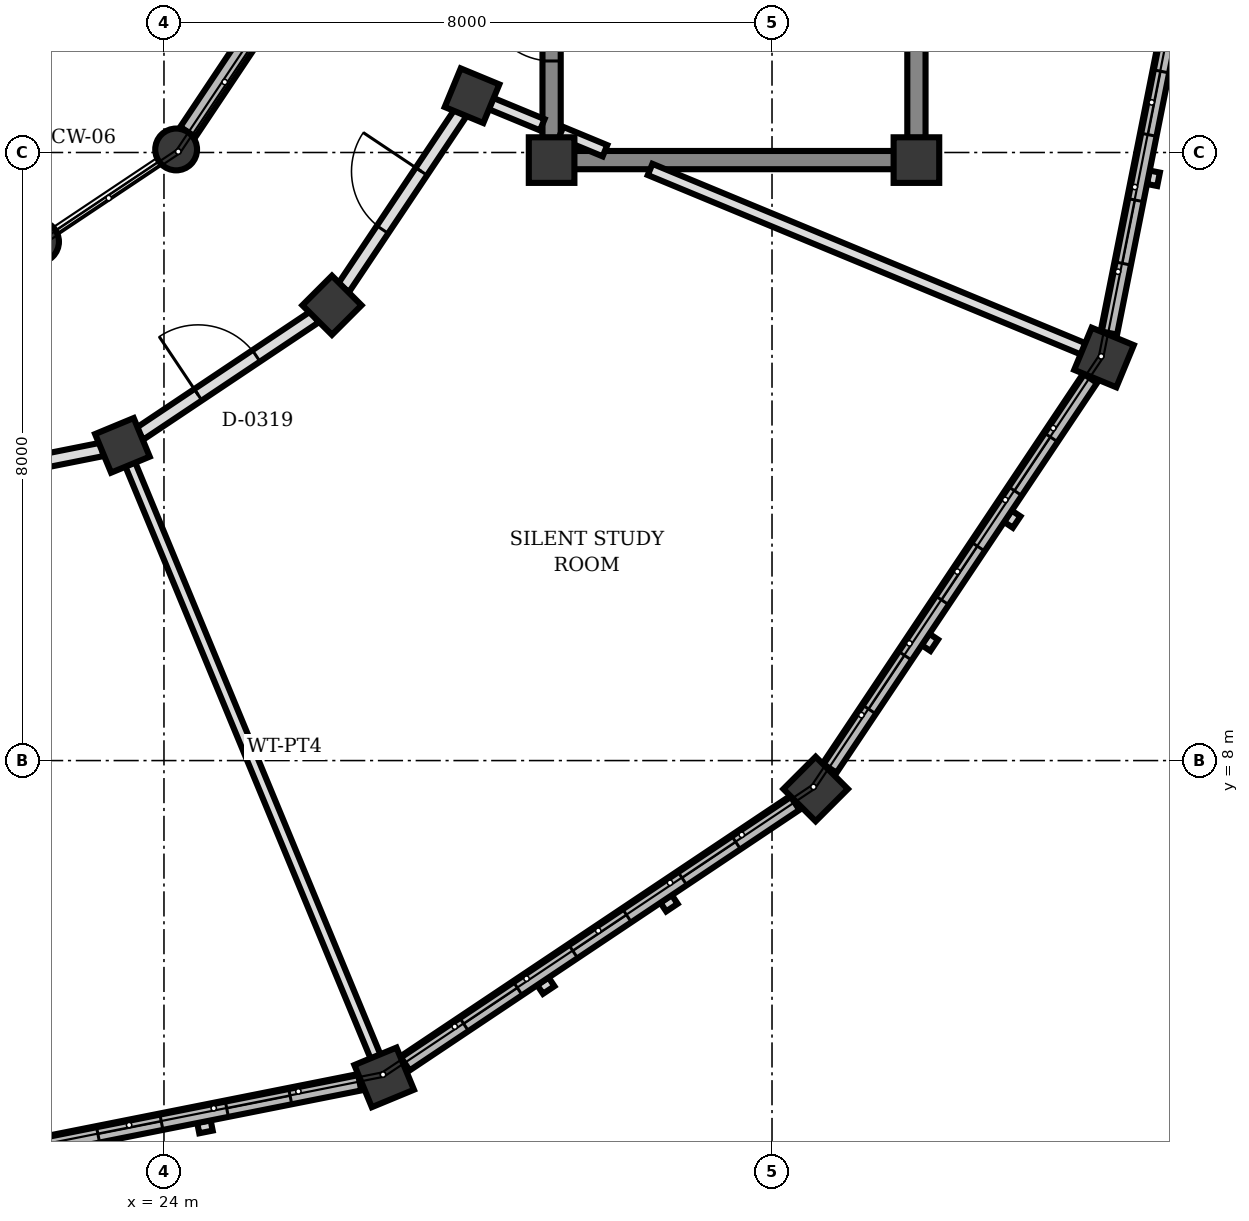
"""IFC4 building model, lengths in metres.
Left out: names, types, materials, properties, quantities, classifications, styles, units other than length and angle.
Written with IfcOpenShell. Run it as: python <this file> out.ifc"""

import sys

from ifc_helpers import new_model, si_unit, direction, frame, frame_2d, origin, origin_2d, place, context, subcontext, project, spatial, rectangle, circle, extrude, element, fill, save


model = new_model("IFC4")
c1 = context("Model", 3, precision=1e-05, world=origin(), true_north=direction((0.0, 1.0)))
c2 = subcontext(c1, "Body", "Model", "MODEL_VIEW")
j1 = project(units=[si_unit("LENGTHUNIT", "METRE"), si_unit("PLANEANGLEUNIT", "RADIAN")], contexts=[c1])
p1 = place(None, origin())
s1 = spatial("IfcSite", under=j1, at=p1, CompositionType="ELEMENT")
p2 = place(p1, origin())
s2 = spatial("IfcBuilding", under=s1, at=p2, CompositionType="ELEMENT")
p3 = place(p2, frame((0.0, 0.0, 12.5)))
s3 = spatial("IfcBuildingStorey", under=s2, at=p3, CompositionType="ELEMENT", Elevation=12.5)
for number, where, z_axis, x_axis in (
    (1, (29.1, 15.9, 0.0), (0.0, 0.0, 1.0), (1.0, 0.0, 0.0)),
    (2, (33.9, 15.9, 0.0), (0.0, 0.0, 1.0), (1.0, 0.0, 0.0)),
):
    element("IfcColumn", number, at=place(p3, frame(where, z_axis=z_axis, x_axis=x_axis)), inside=s3, PredefinedType="COLUMN", context=c2, shape_type="SweptSolid", body=[
        extrude(rectangle(XDim=0.6, YDim=0.6, at=origin_2d()), origin(), (0.0, 0.0, 1.0), 4.0),
    ])
for number, where, z_axis, x_axis in (
    (3, (22.343, 14.826, 0.0), (0.0, 0.0, 1.0), (1.0, 0.0, 0.0)),
    (4, (24.16, 16.04, 0.0), (0.0, 0.0, 1.0), (1.0, 0.0, 0.0)),
):
    element("IfcColumn", number, at=place(p3, frame(where, z_axis=z_axis, x_axis=x_axis)), inside=s3, PredefinedType="COLUMN", context=c2, shape_type="SweptSolid", body=[
        extrude(circle(Radius=0.275, at=origin_2d()), origin(), (0.0, 0.0, 1.0), 3.865),
    ])
for number, where, z_axis, x_axis in (
    (5, (23.453, 12.147, 0.0), (0.0, 0.0, 1.0), (0.383, -0.924, 0.0)),
    (6, (26.21, 13.99, 0.0), (0.0, 0.0, 1.0), (0.707, -0.707, 0.0)),
    (7, (28.053, 16.747, 0.0), (0.0, 0.0, 1.0), (0.924, -0.383, 0.0)),
):
    element("IfcColumn", number, at=place(p3, frame(where, z_axis=z_axis, x_axis=x_axis)), inside=s3, PredefinedType="COLUMN", context=c2, shape_type="SweptSolid", body=[
        extrude(rectangle(XDim=0.55, YDim=0.55, at=origin_2d()), origin(), (0.0, 0.0, 1.0), 4.59),
    ])
for number, where, z_axis, x_axis in (
    (8, (26.897, 3.832, 0.0), (0.0, 0.0, 1.0), (0.383, -0.924, 0.0)),
    (9, (32.574, 7.626, 0.0), (0.0, 0.0, 1.0), (0.707, -0.707, 0.0)),
    (10, (36.368, 13.303, 0.0), (0.0, 0.0, 1.0), (0.924, -0.383, 0.0)),
):
    element("IfcColumn", number, at=place(p3, frame(where, z_axis=z_axis, x_axis=x_axis)), inside=s3, PredefinedType="COLUMN", context=c2, shape_type="SweptSolid", body=[
        extrude(rectangle(XDim=0.6, YDim=0.6, at=origin_2d()), origin(), (0.0, 0.0, 1.0), 6.84),
    ])
p4 = place(p3, frame((26.574, 3.768, 0.0), z_axis=(0.0, 0.0, 1.0), x_axis=(-0.980770460131, -0.195164813773, 0.0)))
e11 = element("IfcWall", 11, at=p4, inside=s3, PredefinedType="SOLIDWALL", context=c2, shape_type="SweptSolid", body=[
    extrude(rectangle(XDim=6.17, YDim=0.22, at=frame_2d((3.085, 0.0))), origin(), (0.0, 0.0, 1.0), 6.35),
])
p5 = place(p4, frame((0.932, 0.0, 0.85)))
e12 = element("IfcOpeningElement", 12, at=p5, cuts=e11, PredefinedType="OPENING", context=c2, shape_type="SweptSolid", body=[
    extrude(rectangle(XDim=0.85, YDim=1.25, at=frame_2d((0.425, 0.625))), frame((0.0, 0.12, 0.0), z_axis=(0.0, -1.0, 0.0), x_axis=(1.0, 0.0, 0.0)), (0.0, 0.0, 1.0), 0.24),
])
p6 = place(p4, frame((2.66, 0.0, 0.85)))
e13 = element("IfcOpeningElement", 13, at=p6, cuts=e11, PredefinedType="OPENING", context=c2, shape_type="SweptSolid", body=[
    extrude(rectangle(XDim=0.85, YDim=1.25, at=frame_2d((0.425, 0.625))), frame((0.0, 0.12, 0.0), z_axis=(0.0, -1.0, 0.0), x_axis=(1.0, 0.0, 0.0)), (0.0, 0.0, 1.0), 0.24),
])
p7 = place(p4, frame((4.387, 0.0, 0.85)))
e14 = element("IfcOpeningElement", 14, at=p7, cuts=e11, PredefinedType="OPENING", context=c2, shape_type="SweptSolid", body=[
    extrude(rectangle(XDim=0.85, YDim=1.25, at=frame_2d((0.425, 0.625))), frame((0.0, 0.12, 0.0), z_axis=(0.0, -1.0, 0.0), x_axis=(1.0, 0.0, 0.0)), (0.0, 0.0, 1.0), 0.24),
])
p8 = place(p3, frame((32.3, 7.443, 0.0), z_axis=(0.0, 0.0, 1.0), x_axis=(-0.831392186772, -0.55568609104, 0.0)))
e15 = element("IfcWall", 15, at=p8, inside=s3, PredefinedType="SOLIDWALL", context=c2, shape_type="SweptSolid", body=[
    extrude(rectangle(XDim=6.169, YDim=0.22, at=frame_2d((3.085, 0.0))), origin(), (0.0, 0.0, 1.0), 6.35),
])
p9 = place(p8, frame((0.932, 0.0, 0.85)))
e16 = element("IfcOpeningElement", 16, at=p9, cuts=e15, PredefinedType="OPENING", context=c2, shape_type="SweptSolid", body=[
    extrude(rectangle(XDim=0.85, YDim=1.25, at=frame_2d((0.425, 0.625))), frame((0.0, 0.12, 0.0), z_axis=(0.0, -1.0, 0.0), x_axis=(1.0, 0.0, 0.0)), (0.0, 0.0, 1.0), 0.24),
])
p10 = place(p8, frame((2.66, 0.0, 0.85)))
e17 = element("IfcOpeningElement", 17, at=p10, cuts=e15, PredefinedType="OPENING", context=c2, shape_type="SweptSolid", body=[
    extrude(rectangle(XDim=0.85, YDim=1.25, at=frame_2d((0.425, 0.625))), frame((0.0, 0.12, 0.0), z_axis=(0.0, -1.0, 0.0), x_axis=(1.0, 0.0, 0.0)), (0.0, 0.0, 1.0), 0.24),
])
p11 = place(p8, frame((4.387, 0.0, 0.85)))
e18 = element("IfcOpeningElement", 18, at=p11, cuts=e15, PredefinedType="OPENING", context=c2, shape_type="SweptSolid", body=[
    extrude(rectangle(XDim=0.85, YDim=1.25, at=frame_2d((0.425, 0.625))), frame((0.0, 0.12, 0.0), z_axis=(0.0, -1.0, 0.0), x_axis=(1.0, 0.0, 0.0)), (0.0, 0.0, 1.0), 0.24),
])
p12 = place(p3, frame((36.185, 13.029, 0.0), z_axis=(0.0, 0.0, 1.0), x_axis=(-0.555658736667, -0.831410469242, 0.0)))
e19 = element("IfcWall", 19, at=p12, inside=s3, PredefinedType="SOLIDWALL", context=c2, shape_type="SweptSolid", body=[
    extrude(rectangle(XDim=6.169, YDim=0.22, at=frame_2d((3.084, 0.0))), origin(), (0.0, 0.0, 1.0), 6.35),
])
p13 = place(p12, frame((0.932, 0.0, 0.85)))
e20 = element("IfcOpeningElement", 20, at=p13, cuts=e19, PredefinedType="OPENING", context=c2, shape_type="SweptSolid", body=[
    extrude(rectangle(XDim=0.85, YDim=1.25, at=frame_2d((0.425, 0.625))), frame((0.0, 0.12, 0.0), z_axis=(0.0, -1.0, 0.0), x_axis=(1.0, 0.0, 0.0)), (0.0, 0.0, 1.0), 0.24),
])
p14 = place(p12, frame((2.66, 0.0, 0.85)))
e21 = element("IfcOpeningElement", 21, at=p14, cuts=e19, PredefinedType="OPENING", context=c2, shape_type="SweptSolid", body=[
    extrude(rectangle(XDim=0.85, YDim=1.25, at=frame_2d((0.425, 0.625))), frame((0.0, 0.12, 0.0), z_axis=(0.0, -1.0, 0.0), x_axis=(1.0, 0.0, 0.0)), (0.0, 0.0, 1.0), 0.24),
])
p15 = place(p12, frame((4.387, 0.0, 0.85)))
e22 = element("IfcOpeningElement", 22, at=p15, cuts=e19, PredefinedType="OPENING", context=c2, shape_type="SweptSolid", body=[
    extrude(rectangle(XDim=0.85, YDim=1.25, at=frame_2d((0.425, 0.625))), frame((0.0, 0.12, 0.0), z_axis=(0.0, -1.0, 0.0), x_axis=(1.0, 0.0, 0.0)), (0.0, 0.0, 1.0), 0.24),
])
p16 = place(p3, frame((24.314, 16.27, 0.0), z_axis=(0.0, 0.0, 1.0), x_axis=(0.555287078904, 0.83165874011, 0.0)))
e23 = element("IfcWall", 23, at=p16, inside=s3, PredefinedType="SOLIDWALL", context=c2, shape_type="SweptSolid", body=[
    extrude(rectangle(XDim=1.632, YDim=0.24, at=frame_2d((0.816, 0.0))), origin(), (0.0, 0.0, 1.0), 3.375),
])
p17 = place(p3, frame((37.636, 19.677, 0.0), z_axis=(0.0, 0.0, 1.0), x_axis=(-0.195164813773, -0.980770460131, 0.0)))
e24 = element("IfcWall", 24, at=p17, inside=s3, PredefinedType="SOLIDWALL", context=c2, shape_type="SweptSolid", body=[
    extrude(rectangle(XDim=6.17, YDim=0.22, at=frame_2d((3.085, 0.0))), origin(), (0.0, 0.0, 1.0), 6.35),
])
p18 = place(p17, frame((0.932, 0.0, 0.85)))
e25 = element("IfcOpeningElement", 25, at=p18, cuts=e24, PredefinedType="OPENING", context=c2, shape_type="SweptSolid", body=[
    extrude(rectangle(XDim=0.85, YDim=1.25, at=frame_2d((0.425, 0.625))), frame((0.0, 0.12, 0.0), z_axis=(0.0, -1.0, 0.0), x_axis=(1.0, 0.0, 0.0)), (0.0, 0.0, 1.0), 0.24),
])
p19 = place(p17, frame((2.66, 0.0, 0.85)))
e26 = element("IfcOpeningElement", 26, at=p19, cuts=e24, PredefinedType="OPENING", context=c2, shape_type="SweptSolid", body=[
    extrude(rectangle(XDim=0.85, YDim=1.25, at=frame_2d((0.425, 0.625))), frame((0.0, 0.12, 0.0), z_axis=(0.0, -1.0, 0.0), x_axis=(1.0, 0.0, 0.0)), (0.0, 0.0, 1.0), 0.24),
])
p20 = place(p17, frame((4.387, 0.0, 0.85)))
e27 = element("IfcOpeningElement", 27, at=p20, cuts=e24, PredefinedType="OPENING", context=c2, shape_type="SweptSolid", body=[
    extrude(rectangle(XDim=0.85, YDim=1.25, at=frame_2d((0.425, 0.625))), frame((0.0, 0.12, 0.0), z_axis=(0.0, -1.0, 0.0), x_axis=(1.0, 0.0, 0.0)), (0.0, 0.0, 1.0), 0.24),
])
p21 = place(p3, frame((29.1, 16.192, 0.0), z_axis=(0.0, 0.0, 1.0), x_axis=(0.0, 1.0, 0.0)))
e28 = element("IfcWall", 28, at=p21, inside=s3, PredefinedType="SHEAR", context=c2, shape_type="SweptSolid", body=[
    extrude(rectangle(XDim=8.136, YDim=0.24, at=frame_2d((4.068, 0.0))), origin(), (0.0, 0.0, 1.0), 3.74),
])
p22 = place(p21, frame((1.012, 0.0, 0.0)))
e29 = element("IfcOpeningElement", 29, at=p22, cuts=e28, PredefinedType="OPENING", context=c2, shape_type="SweptSolid", body=[
    extrude(rectangle(XDim=0.88, YDim=2.1, at=frame_2d((0.44, 1.05))), frame((0.0, 0.13, 0.0), z_axis=(0.0, -1.0, 0.0), x_axis=(1.0, 0.0, 0.0)), (0.0, 0.0, 1.0), 0.26),
])
p23 = place(p3, frame((33.9, 24.328, 0.0), z_axis=(0.0, 0.0, 1.0), x_axis=(0.0, -1.0, 0.0)))
e30 = element("IfcWall", 30, at=p23, inside=s3, PredefinedType="SHEAR", context=c2, shape_type="SweptSolid", body=[
    extrude(rectangle(XDim=8.136, YDim=0.24, at=frame_2d((4.068, 0.0))), origin(), (0.0, 0.0, 1.0), 3.74),
])
p24 = place(p3, frame((33.608, 15.9, 0.0), z_axis=(0.0, 0.0, 1.0), x_axis=(-1.0, 0.0, 0.0)))
e31 = element("IfcWall", 31, at=p24, inside=s3, PredefinedType="SHEAR", context=c2, shape_type="SweptSolid", body=[
    extrude(rectangle(XDim=4.216, YDim=0.24, at=frame_2d((2.108, 0.0))), origin(), (0.0, 0.0, 1.0), 3.74),
])
p25 = place(p3, frame((23.555, 11.9, 0.0), z_axis=(0.0, 0.0, 1.0), x_axis=(0.382683896966, -0.923879340067, 0.0)))
e32 = element("IfcWall", 32, at=p25, inside=s3, PredefinedType="PARTITIONING", context=c2, shape_type="SweptSolid", body=[
    extrude(rectangle(XDim=8.44, YDim=0.14, at=frame_2d((4.22, 0.0))), origin(), (0.0, 0.0, 1.0), 3.7),
])
p26 = place(p3, frame((28.3, 16.645, 0.0), z_axis=(0.0, 0.0, 1.0), x_axis=(0.924069600435, -0.382224245113, 0.0)))
e33 = element("IfcWall", 33, at=p26, inside=s3, PredefinedType="PARTITIONING", context=c2, shape_type="SweptSolid", body=[
    extrude(rectangle(XDim=0.733, YDim=0.16, at=frame_2d((0.366, 0.0))), origin(), (0.0, 0.0, 1.0), 3.7),
])
p27 = place(p3, frame((29.223, 16.263, 0.0), z_axis=(0.0, 0.0, 1.0), x_axis=(0.923812676193, -0.382844797933, 0.0)))
e34 = element("IfcWall", 34, at=p27, inside=s3, PredefinedType="PARTITIONING", context=c2, shape_type="SweptSolid", body=[
    extrude(rectangle(XDim=0.627, YDim=0.16, at=frame_2d((0.313, 0.0))), origin(), (0.0, 0.0, 1.0), 3.7),
])
p28 = place(p3, frame((30.396, 15.777, 0.0), z_axis=(0.0, 0.0, 1.0), x_axis=(0.923864955254, -0.382718623082, 0.0)))
e35 = element("IfcWall", 35, at=p28, inside=s3, PredefinedType="PARTITIONING", context=c2, shape_type="SweptSolid", body=[
    extrude(rectangle(XDim=6.172, YDim=0.16, at=frame_2d((3.086, 0.0))), origin(), (0.0, 0.0, 1.0), 3.7),
])
p29 = place(p3, frame((20.467, 11.553, 0.0), z_axis=(0.0, 0.0, 1.0), x_axis=(0.980773264811, 0.195150718759, 0.0)))
e36 = element("IfcWall", 36, at=p29, inside=s3, PredefinedType="PARTITIONING", context=c2, shape_type="SweptSolid", body=[
    extrude(rectangle(XDim=2.772, YDim=0.18, at=frame_2d((1.386, 0.0))), origin(), (0.0, 0.0, 1.0), 3.7),
])
p30 = place(p29, frame((0.926, 0.0, 0.0)))
e37 = element("IfcOpeningElement", 37, at=p30, cuts=e36, PredefinedType="OPENING", context=c2, shape_type="SweptSolid", body=[
    extrude(rectangle(XDim=0.92, YDim=2.1, at=frame_2d((0.46, 1.05))), frame((0.0, 0.1, 0.0), z_axis=(0.0, -1.0, 0.0), x_axis=(1.0, 0.0, 0.0)), (0.0, 0.0, 1.0), 0.2),
])
p31 = place(p3, frame((23.679, 12.298, 0.0), z_axis=(0.0, 0.0, 1.0), x_axis=(0.831318045056, 0.555797002478, 0.0)))
e38 = element("IfcWall", 38, at=p31, inside=s3, PredefinedType="PARTITIONING", context=c2, shape_type="SweptSolid", body=[
    extrude(rectangle(XDim=2.773, YDim=0.18, at=frame_2d((1.386, 0.0))), origin(), (0.0, 0.0, 1.0), 3.7),
])
p32 = place(p31, frame((0.926, 0.0, 0.0)))
e39 = element("IfcOpeningElement", 39, at=p32, cuts=e38, PredefinedType="OPENING", context=c2, shape_type="SweptSolid", body=[
    extrude(rectangle(XDim=0.92, YDim=2.1, at=frame_2d((0.46, 1.05))), frame((0.0, 0.1, 0.0), z_axis=(0.0, -1.0, 0.0), x_axis=(1.0, 0.0, 0.0)), (0.0, 0.0, 1.0), 0.2),
])
p33 = place(p3, frame((26.361, 14.216, 0.0), z_axis=(0.0, 0.0, 1.0), x_axis=(0.555797002478, 0.831318045056, 0.0)))
e40 = element("IfcWall", 40, at=p33, inside=s3, PredefinedType="PARTITIONING", context=c2, shape_type="SweptSolid", body=[
    extrude(rectangle(XDim=2.773, YDim=0.18, at=frame_2d((1.386, 0.0))), origin(), (0.0, 0.0, 1.0), 3.7),
])
p34 = place(p33, frame((0.926, 0.0, 0.0)))
e41 = element("IfcOpeningElement", 41, at=p34, cuts=e40, PredefinedType="OPENING", context=c2, shape_type="SweptSolid", body=[
    extrude(rectangle(XDim=0.92, YDim=2.1, at=frame_2d((0.46, 1.05))), frame((0.0, 0.1, 0.0), z_axis=(0.0, -1.0, 0.0), x_axis=(1.0, 0.0, 0.0)), (0.0, 0.0, 1.0), 0.2),
])
p35 = place(p5, origin())
e42 = element("IfcWindow", 42, at=p35, inside=s3, PartitioningType="SINGLE_PANEL", PredefinedType="WINDOW", context=c2, shape_type="SweptSolid", body=[
    extrude(rectangle(XDim=0.85, YDim=1.25, at=frame_2d((0.425, 0.625))), frame((0.0, 0.03, 0.0), z_axis=(0.0, -1.0, 0.0), x_axis=(1.0, 0.0, 0.0)), (0.0, 0.0, 1.0), 0.06),
])
fill(e12, e42)
p36 = place(p6, origin())
e43 = element("IfcWindow", 43, at=p36, inside=s3, PartitioningType="SINGLE_PANEL", PredefinedType="WINDOW", context=c2, shape_type="SweptSolid", body=[
    extrude(rectangle(XDim=0.85, YDim=1.25, at=frame_2d((0.425, 0.625))), frame((0.0, 0.03, 0.0), z_axis=(0.0, -1.0, 0.0), x_axis=(1.0, 0.0, 0.0)), (0.0, 0.0, 1.0), 0.06),
])
fill(e13, e43)
p37 = place(p9, origin())
e44 = element("IfcWindow", 44, at=p37, inside=s3, PartitioningType="SINGLE_PANEL", PredefinedType="WINDOW", context=c2, shape_type="SweptSolid", body=[
    extrude(rectangle(XDim=0.85, YDim=1.25, at=frame_2d((0.425, 0.625))), frame((0.0, 0.03, 0.0), z_axis=(0.0, -1.0, 0.0), x_axis=(1.0, 0.0, 0.0)), (0.0, 0.0, 1.0), 0.06),
])
fill(e16, e44)
p38 = place(p10, origin())
e45 = element("IfcWindow", 45, at=p38, inside=s3, PartitioningType="SINGLE_PANEL", PredefinedType="WINDOW", context=c2, shape_type="SweptSolid", body=[
    extrude(rectangle(XDim=0.85, YDim=1.25, at=frame_2d((0.425, 0.625))), frame((0.0, 0.03, 0.0), z_axis=(0.0, -1.0, 0.0), x_axis=(1.0, 0.0, 0.0)), (0.0, 0.0, 1.0), 0.06),
])
fill(e17, e45)
p39 = place(p11, origin())
e46 = element("IfcWindow", 46, at=p39, inside=s3, PartitioningType="SINGLE_PANEL", PredefinedType="WINDOW", context=c2, shape_type="SweptSolid", body=[
    extrude(rectangle(XDim=0.85, YDim=1.25, at=frame_2d((0.425, 0.625))), frame((0.0, 0.03, 0.0), z_axis=(0.0, -1.0, 0.0), x_axis=(1.0, 0.0, 0.0)), (0.0, 0.0, 1.0), 0.06),
])
fill(e18, e46)
p40 = place(p13, origin())
e47 = element("IfcWindow", 47, at=p40, inside=s3, PartitioningType="SINGLE_PANEL", PredefinedType="WINDOW", context=c2, shape_type="SweptSolid", body=[
    extrude(rectangle(XDim=0.85, YDim=1.25, at=frame_2d((0.425, 0.625))), frame((0.0, 0.03, 0.0), z_axis=(0.0, -1.0, 0.0), x_axis=(1.0, 0.0, 0.0)), (0.0, 0.0, 1.0), 0.06),
])
fill(e20, e47)
p41 = place(p14, origin())
e48 = element("IfcWindow", 48, at=p41, inside=s3, PartitioningType="SINGLE_PANEL", PredefinedType="WINDOW", context=c2, shape_type="SweptSolid", body=[
    extrude(rectangle(XDim=0.85, YDim=1.25, at=frame_2d((0.425, 0.625))), frame((0.0, 0.03, 0.0), z_axis=(0.0, -1.0, 0.0), x_axis=(1.0, 0.0, 0.0)), (0.0, 0.0, 1.0), 0.06),
])
fill(e21, e48)
p42 = place(p15, origin())
e49 = element("IfcWindow", 49, at=p42, inside=s3, PartitioningType="SINGLE_PANEL", PredefinedType="WINDOW", context=c2, shape_type="SweptSolid", body=[
    extrude(rectangle(XDim=0.85, YDim=1.25, at=frame_2d((0.425, 0.625))), frame((0.0, 0.03, 0.0), z_axis=(0.0, -1.0, 0.0), x_axis=(1.0, 0.0, 0.0)), (0.0, 0.0, 1.0), 0.06),
])
fill(e22, e49)
p43 = place(p19, origin())
e50 = element("IfcWindow", 50, at=p43, inside=s3, PartitioningType="SINGLE_PANEL", PredefinedType="WINDOW", context=c2, shape_type="SweptSolid", body=[
    extrude(rectangle(XDim=0.85, YDim=1.25, at=frame_2d((0.425, 0.625))), frame((0.0, 0.03, 0.0), z_axis=(0.0, -1.0, 0.0), x_axis=(1.0, 0.0, 0.0)), (0.0, 0.0, 1.0), 0.06),
])
fill(e26, e50)
p44 = place(p20, origin())
e51 = element("IfcWindow", 51, at=p44, inside=s3, PartitioningType="SINGLE_PANEL", PredefinedType="WINDOW", context=c2, shape_type="SweptSolid", body=[
    extrude(rectangle(XDim=0.85, YDim=1.25, at=frame_2d((0.425, 0.625))), frame((0.0, 0.03, 0.0), z_axis=(0.0, -1.0, 0.0), x_axis=(1.0, 0.0, 0.0)), (0.0, 0.0, 1.0), 0.06),
])
fill(e27, e51)
p45 = place(p22, origin())
e52 = element("IfcDoor", 52, at=p45, inside=s3, OperationType="SINGLE_SWING_RIGHT", PredefinedType="DOOR", context=c2, shape_type="SweptSolid", body=[
    extrude(rectangle(XDim=0.88, YDim=2.1, at=frame_2d((0.44, 1.05))), frame((0.0, 0.025, 0.0), z_axis=(0.0, -1.0, 0.0), x_axis=(1.0, 0.0, 0.0)), (0.0, 0.0, 1.0), 0.05),
])
fill(e29, e52)
p46 = place(p32, origin())
e53 = element("IfcDoor", 53, at=p46, inside=s3, OperationType="SINGLE_SWING_LEFT", PredefinedType="DOOR", context=c2, shape_type="SweptSolid", body=[
    extrude(rectangle(XDim=0.92, YDim=2.1, at=frame_2d((0.46, 1.05))), frame((0.0, 0.025, 0.0), z_axis=(0.0, -1.0, 0.0), x_axis=(1.0, 0.0, 0.0)), (0.0, 0.0, 1.0), 0.05),
])
fill(e39, e53)
p47 = place(p34, origin())
e54 = element("IfcDoor", 54, at=p47, inside=s3, OperationType="SINGLE_SWING_RIGHT", PredefinedType="DOOR", context=c2, shape_type="SweptSolid", body=[
    extrude(rectangle(XDim=0.92, YDim=2.1, at=frame_2d((0.46, 1.05))), frame((0.0, 0.025, 0.0), z_axis=(0.0, -1.0, 0.0), x_axis=(1.0, 0.0, 0.0)), (0.0, 0.0, 1.0), 0.05),
])
fill(e41, e54)
save(model, sys.argv[1])
